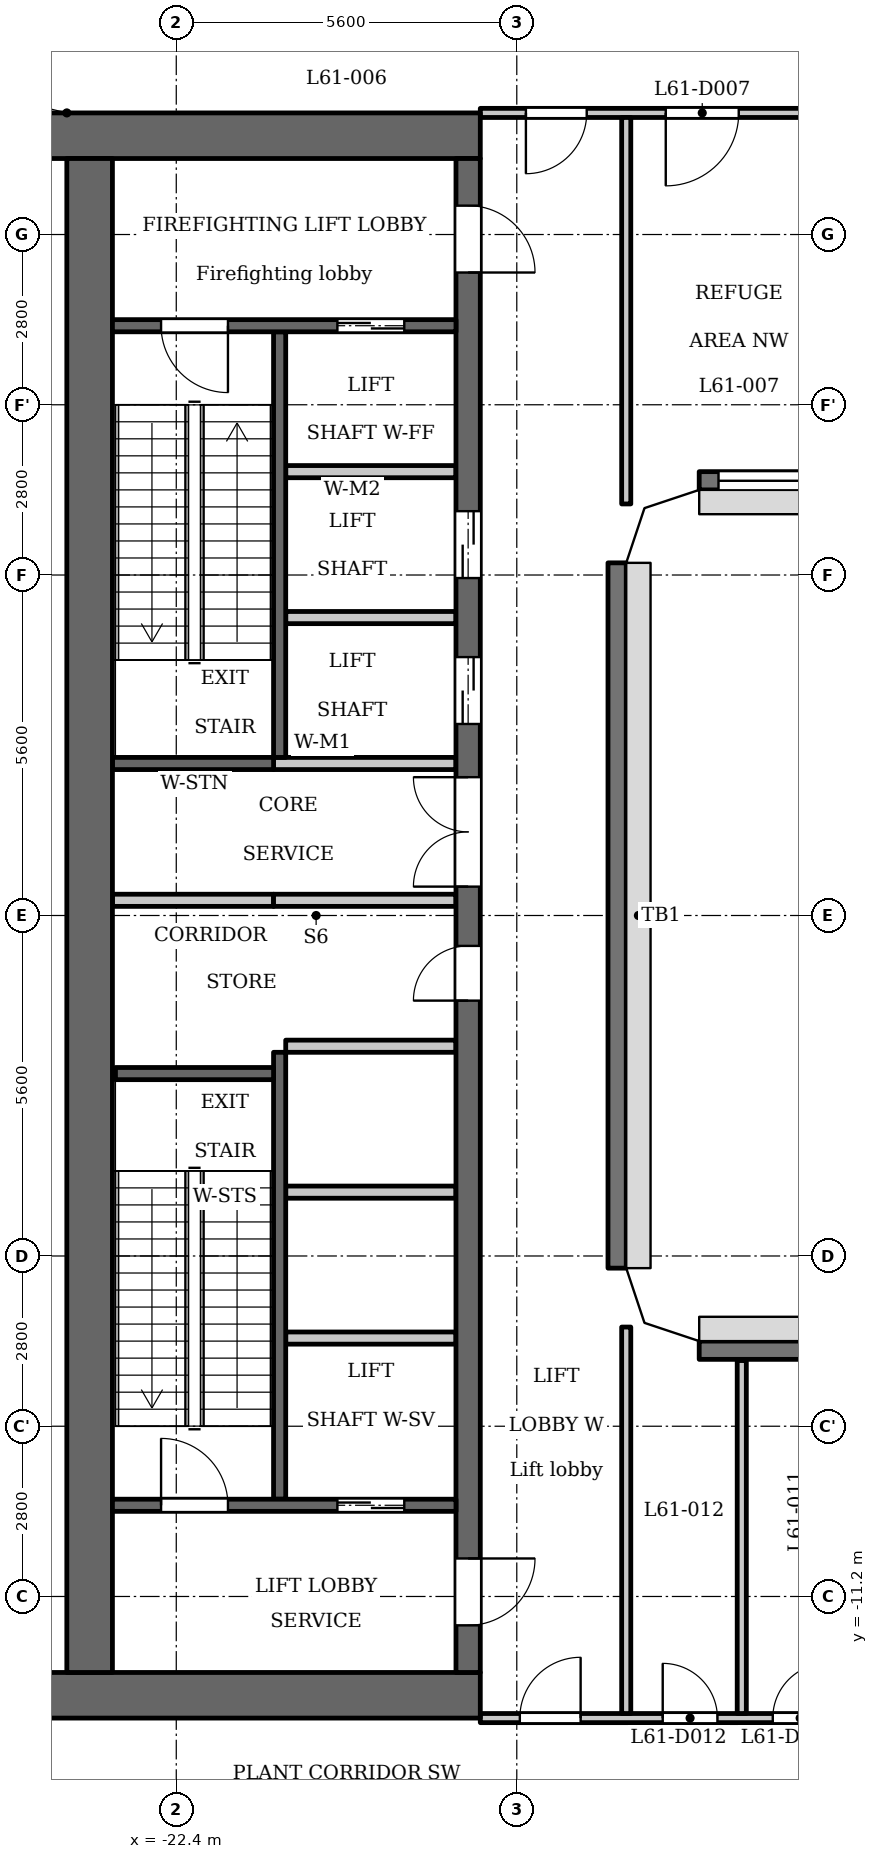
"""IFC4 building model, lengths in metres.
Left out: names, types, materials, properties, quantities, classifications, styles, units other than length and angle.
Written with IfcOpenShell. Run it as: python <this file> out.ifc"""

import sys

from ifc_helpers import new_model, si_unit, direction, frame, frame_2d, origin, place, context, subcontext, project, spatial, polyline, rectangle, outline, extrude, element, fill, save


model = new_model("IFC4")
c1 = context("Model", 3, precision=1e-05, world=origin(), true_north=direction((0.0, 1.0)))
c2 = subcontext(c1, "Body", "Model", "MODEL_VIEW")
j1 = project(units=[si_unit("LENGTHUNIT", "METRE"), si_unit("PLANEANGLEUNIT", "RADIAN")], contexts=[c1])
p1 = place(None, origin())
s1 = spatial("IfcSite", under=j1, at=p1, CompositionType="ELEMENT")
p2 = place(p1, origin())
s2 = spatial("IfcBuilding", under=s1, at=p2, CompositionType="ELEMENT")
p3 = place(p2, frame((0.0, 0.0, 236.3)))
s3 = spatial("IfcBuildingStorey", under=s2, at=p3, CompositionType="ELEMENT", Elevation=236.3)
p4 = place(p3, frame((-11.2, -7.15, 0.0), z_axis=(0.0, 0.0, 1.0), x_axis=(-1.0, 0.0, 0.0)))
e1 = element("IfcWall", 1, at=p4, inside=s3, PredefinedType="SOLIDWALL", context=c2, shape_type="SweptSolid", body=[
    extrude(rectangle(XDim=2.6, YDim=0.3, at=frame_2d((1.3, 0.0))), origin(), (0.0, 0.0, 1.0), 4.6),
])
p5 = place(p3, frame((-15.15, -5.8, 0.0), z_axis=(0.0, 0.0, 1.0), x_axis=(0.0, 1.0, 0.0)))
e2 = element("IfcWall", 2, at=p5, inside=s3, PredefinedType="SOLIDWALL", context=c2, shape_type="SweptSolid", body=[
    extrude(rectangle(XDim=11.6, YDim=0.3, at=frame_2d((5.8, 0.0))), origin(), (0.0, 0.0, 1.0), 4.6),
])
p6 = place(p3, frame((-13.8, 7.15, 0.0), z_axis=(0.0, 0.0, 1.0), x_axis=(1.0, 0.0, 0.0)))
e3 = element("IfcWall", 3, at=p6, inside=s3, PredefinedType="SOLIDWALL", context=c2, shape_type="SweptSolid", body=[
    extrude(rectangle(XDim=2.6, YDim=0.3, at=frame_2d((1.3, 0.0))), origin(), (0.0, 0.0, 1.0), 4.6),
])
p7 = place(p6, frame((0.317, 0.0, 0.9)))
e4 = element("IfcOpeningElement", 4, at=p7, cuts=e3, PredefinedType="OPENING", context=c2, shape_type="SweptSolid", body=[
    extrude(rectangle(XDim=1.8, YDim=1.5, at=frame_2d((0.9, 0.75))), frame((0.0, 0.16, 0.0), z_axis=(0.0, -1.0, 0.0), x_axis=(1.0, 0.0, 0.0)), (0.0, 0.0, 1.0), 0.32),
])
p8 = place(p3, frame((-20.7, 2.6, 0.0), z_axis=(0.0, 0.0, 1.0), x_axis=(0.0, 1.0, 0.0)))
e5 = element("IfcWall", 5, at=p8, inside=s3, PredefinedType="SHEAR", context=c2, shape_type="SweptSolid", body=[
    extrude(rectangle(XDim=7.0, YDim=0.2, at=frame_2d((3.5, 0.0))), origin(), (0.0, 0.0, 1.0), 4.6),
])
p9 = place(p3, frame((-20.7, -9.6, 0.0), z_axis=(0.0, 0.0, 1.0), x_axis=(0.0, 1.0, 0.0)))
e6 = element("IfcWall", 6, at=p9, inside=s3, PredefinedType="SHEAR", context=c2, shape_type="SweptSolid", body=[
    extrude(rectangle(XDim=7.35, YDim=0.2, at=frame_2d((3.675, 0.0))), origin(), (0.0, 0.0, 1.0), 4.6),
])
p10 = place(p3, frame((-20.8, 2.5, 0.0), z_axis=(0.0, 0.0, 1.0), x_axis=(-1.0, 0.0, 0.0)))
e7 = element("IfcWall", 7, at=p10, inside=s3, PredefinedType="SHEAR", context=c2, shape_type="SweptSolid", body=[
    extrude(rectangle(XDim=2.65, YDim=0.2, at=frame_2d((1.325, 0.0))), origin(), (0.0, 0.0, 1.0), 4.6),
])
p11 = place(p3, frame((-20.8, 0.25, 0.0), z_axis=(0.0, 0.0, 1.0), x_axis=(-1.0, 0.0, 0.0)))
e8 = element("IfcWall", 8, at=p11, inside=s3, PredefinedType="PARTITIONING", context=c2, shape_type="SweptSolid", body=[
    extrude(rectangle(XDim=2.65, YDim=0.2, at=frame_2d((1.325, 0.0))), origin(), (0.0, 0.0, 1.0), 4.6),
])
for number, where, z_axis, x_axis in (
    (9, (-17.4, 12.825, 0.0), (0.0, 0.0, 1.0), (-1.0, 0.0, 0.0)),
    (10, (-17.4, -12.825, 0.0), (0.0, 0.0, 1.0), (-1.0, 0.0, 0.0)),
):
    element("IfcWall", number, at=place(p3, frame(where, z_axis=z_axis, x_axis=x_axis)), inside=s3, PredefinedType="SHEAR", context=c2, shape_type="SweptSolid", body=[
        extrude(rectangle(XDim=7.6, YDim=0.75, at=frame_2d((3.8, 0.0))), origin(), (0.0, 0.0, 1.0), 4.6),
    ])
p12 = place(p3, frame((-17.6, -12.45, 0.0), z_axis=(0.0, 0.0, 1.0), x_axis=(0.0, 1.0, 0.0)))
e11 = element("IfcWall", 11, at=p12, inside=s3, PredefinedType="SHEAR", context=c2, shape_type="SweptSolid", body=[
    extrude(rectangle(XDim=24.9, YDim=0.4, at=frame_2d((12.45, 0.0))), origin(), (0.0, 0.0, 1.0), 4.6),
])
p13 = place(p12, frame((11.05, 0.0, 0.0)))
e12 = element("IfcOpeningElement", 12, at=p13, cuts=e11, PredefinedType="OPENING", context=c2, shape_type="SweptSolid", body=[
    extrude(rectangle(XDim=0.9, YDim=2.1, at=frame_2d((0.45, 1.05))), frame((0.0, 0.21, 0.0), z_axis=(0.0, -1.0, 0.0), x_axis=(1.0, 0.0, 0.0)), (0.0, 0.0, 1.0), 0.42),
])
p14 = place(p12, frame((15.6, 0.0, 0.0)))
e13 = element("IfcOpeningElement", 13, at=p14, cuts=e11, PredefinedType="OPENING", context=c2, shape_type="SweptSolid", body=[
    extrude(rectangle(XDim=1.1, YDim=2.1, at=frame_2d((0.55, 1.05))), frame((0.0, 0.21, 0.0), z_axis=(0.0, -1.0, 0.0), x_axis=(1.0, 0.0, 0.0)), (0.0, 0.0, 1.0), 0.42),
])
p15 = place(p12, frame((18.0, 0.0, 0.0)))
e14 = element("IfcOpeningElement", 14, at=p15, cuts=e11, PredefinedType="OPENING", context=c2, shape_type="SweptSolid", body=[
    extrude(rectangle(XDim=1.1, YDim=2.1, at=frame_2d((0.55, 1.05))), frame((0.0, 0.21, 0.0), z_axis=(0.0, -1.0, 0.0), x_axis=(1.0, 0.0, 0.0)), (0.0, 0.0, 1.0), 0.42),
])
p16 = place(p12, frame((23.025, 0.0, 0.0)))
e15 = element("IfcOpeningElement", 15, at=p16, cuts=e11, PredefinedType="OPENING", context=c2, shape_type="SweptSolid", body=[
    extrude(rectangle(XDim=1.1, YDim=2.1, at=frame_2d((0.55, 1.05))), frame((0.0, 0.21, 0.0), z_axis=(0.0, -1.0, 0.0), x_axis=(1.0, 0.0, 0.0)), (0.0, 0.0, 1.0), 0.42),
])
p17 = place(p12, frame((0.775, 0.0, 0.0)))
e16 = element("IfcOpeningElement", 16, at=p17, cuts=e11, PredefinedType="OPENING", context=c2, shape_type="SweptSolid", body=[
    extrude(rectangle(XDim=1.1, YDim=2.1, at=frame_2d((0.55, 1.05))), frame((0.0, 0.21, 0.0), z_axis=(0.0, -1.0, 0.0), x_axis=(1.0, 0.0, 0.0)), (0.0, 0.0, 1.0), 0.42),
])
p18 = place(p12, frame((12.925, 0.0, 0.0)))
e17 = element("IfcOpeningElement", 17, at=p18, cuts=e11, PredefinedType="OPENING", context=c2, shape_type="SweptSolid", body=[
    extrude(rectangle(XDim=1.8, YDim=2.1, at=frame_2d((0.9, 1.05))), frame((0.0, 0.21, 0.0), z_axis=(0.0, -1.0, 0.0), x_axis=(1.0, 0.0, 0.0)), (0.0, 0.0, 1.0), 0.42),
])
p19 = place(p3, frame((-23.825, -12.45, 0.0), z_axis=(0.0, 0.0, 1.0), x_axis=(0.0, 1.0, 0.0)))
e18 = element("IfcWall", 18, at=p19, inside=s3, PredefinedType="SHEAR", context=c2, shape_type="SweptSolid", body=[
    extrude(rectangle(XDim=24.9, YDim=0.75, at=frame_2d((12.45, 0.0))), origin(), (0.0, 0.0, 1.0), 4.6),
])
p20 = place(p3, frame((-17.8, -9.7, 0.0), z_axis=(0.0, 0.0, 1.0), x_axis=(-1.0, 0.0, 0.0)))
e19 = element("IfcWall", 19, at=p20, inside=s3, PredefinedType="SHEAR", context=c2, shape_type="SweptSolid", body=[
    extrude(rectangle(XDim=5.65, YDim=0.2, at=frame_2d((2.825, 0.0))), origin(), (0.0, 0.0, 1.0), 4.6),
])
p21 = place(p20, frame((0.85, 0.0, 0.0)))
e20 = element("IfcOpeningElement", 20, at=p21, cuts=e19, PredefinedType="OPENING", context=c2, shape_type="SweptSolid", body=[
    extrude(rectangle(XDim=1.1, YDim=2.1, at=frame_2d((0.55, 1.05))), frame((0.0, 0.11, 0.0), z_axis=(0.0, -1.0, 0.0), x_axis=(1.0, 0.0, 0.0)), (0.0, 0.0, 1.0), 0.22),
])
p22 = place(p20, frame((3.75, 0.0, 0.0)))
e21 = element("IfcOpeningElement", 21, at=p22, cuts=e19, PredefinedType="OPENING", context=c2, shape_type="SweptSolid", body=[
    extrude(rectangle(XDim=1.1, YDim=2.1, at=frame_2d((0.55, 1.05))), frame((0.0, 0.11, 0.0), z_axis=(0.0, -1.0, 0.0), x_axis=(1.0, 0.0, 0.0)), (0.0, 0.0, 1.0), 0.22),
])
for number, where, z_axis, x_axis in (
    (22, (-17.8, -6.95, 0.0), (0.0, 0.0, 1.0), (-1.0, 0.0, 0.0)),
    (23, (-17.8, -4.55, 0.0), (0.0, 0.0, 1.0), (-1.0, 0.0, 0.0)),
    (24, (-17.8, -2.15, 0.0), (0.0, 0.0, 1.0), (-1.0, 0.0, 0.0)),
):
    element("IfcWall", number, at=place(p3, frame(where, z_axis=z_axis, x_axis=x_axis)), inside=s3, PredefinedType="PARTITIONING", context=c2, shape_type="SweptSolid", body=[
        extrude(rectangle(XDim=2.8, YDim=0.2, at=frame_2d((1.4, 0.0))), origin(), (0.0, 0.0, 1.0), 4.6),
    ])
for number, where, z_axis, x_axis in (
    (25, (-17.8, 0.25, 0.0), (0.0, 0.0, 1.0), (-1.0, 0.0, 0.0)),
    (26, (-17.8, 2.5, 0.0), (0.0, 0.0, 1.0), (-1.0, 0.0, 0.0)),
):
    element("IfcWall", number, at=place(p3, frame(where, z_axis=z_axis, x_axis=x_axis)), inside=s3, PredefinedType="PARTITIONING", context=c2, shape_type="SweptSolid", body=[
        extrude(rectangle(XDim=3.0, YDim=0.2, at=frame_2d((1.5, 0.0))), origin(), (0.0, 0.0, 1.0), 4.6),
    ])
for number, where, z_axis, x_axis in (
    (27, (-17.8, 4.9, 0.0), (0.0, 0.0, 1.0), (-1.0, 0.0, 0.0)),
    (28, (-17.8, 7.3, 0.0), (0.0, 0.0, 1.0), (-1.0, 0.0, 0.0)),
):
    element("IfcWall", number, at=place(p3, frame(where, z_axis=z_axis, x_axis=x_axis)), inside=s3, PredefinedType="PARTITIONING", context=c2, shape_type="SweptSolid", body=[
        extrude(rectangle(XDim=2.8, YDim=0.2, at=frame_2d((1.4, 0.0))), origin(), (0.0, 0.0, 1.0), 4.6),
    ])
p23 = place(p3, frame((-17.8, 9.7, 0.0), z_axis=(0.0, 0.0, 1.0), x_axis=(-1.0, 0.0, 0.0)))
e29 = element("IfcWall", 29, at=p23, inside=s3, PredefinedType="SHEAR", context=c2, shape_type="SweptSolid", body=[
    extrude(rectangle(XDim=5.65, YDim=0.2, at=frame_2d((2.825, 0.0))), origin(), (0.0, 0.0, 1.0), 4.6),
])
p24 = place(p23, frame((0.85, 0.0, 0.0)))
e30 = element("IfcOpeningElement", 30, at=p24, cuts=e29, PredefinedType="OPENING", context=c2, shape_type="SweptSolid", body=[
    extrude(rectangle(XDim=1.1, YDim=2.1, at=frame_2d((0.55, 1.05))), frame((0.0, 0.11, 0.0), z_axis=(0.0, -1.0, 0.0), x_axis=(1.0, 0.0, 0.0)), (0.0, 0.0, 1.0), 0.22),
])
p25 = place(p23, frame((3.75, 0.0, 0.0)))
e31 = element("IfcOpeningElement", 31, at=p25, cuts=e29, PredefinedType="OPENING", context=c2, shape_type="SweptSolid", body=[
    extrude(rectangle(XDim=1.1, YDim=2.1, at=frame_2d((0.55, 1.05))), frame((0.0, 0.11, 0.0), z_axis=(0.0, -1.0, 0.0), x_axis=(1.0, 0.0, 0.0)), (0.0, 0.0, 1.0), 0.22),
])
p26 = place(p3, frame((-20.8, -2.6, 0.0), z_axis=(0.0, 0.0, 1.0), x_axis=(-1.0, 0.0, 0.0)))
e32 = element("IfcWall", 32, at=p26, inside=s3, PredefinedType="SHEAR", context=c2, shape_type="SweptSolid", body=[
    extrude(rectangle(XDim=2.6, YDim=0.2, at=frame_2d((1.3, 0.0))), origin(), (0.0, 0.0, 1.0), 4.6),
])
p27 = place(p3, frame((-17.4, -13.2, 0.0), z_axis=(0.0, 0.0, 1.0), x_axis=(1.0, 0.0, 0.0)))
e33 = element("IfcWall", 33, at=p27, inside=s3, PredefinedType="PARTITIONING", context=c2, shape_type="SweptSolid", body=[
    extrude(rectangle(XDim=5.88, YDim=0.15, at=frame_2d((2.94, 0.0))), origin(), (0.0, 0.0, 1.0), 4.6),
])
p28 = place(p27, frame((0.65, 0.0, 0.0)))
e34 = element("IfcOpeningElement", 34, at=p28, cuts=e33, PredefinedType="OPENING", context=c2, shape_type="SweptSolid", body=[
    extrude(rectangle(XDim=1.0, YDim=2.1, at=frame_2d((0.5, 1.05))), frame((0.0, 0.085, 0.0), z_axis=(0.0, -1.0, 0.0), x_axis=(1.0, 0.0, 0.0)), (0.0, 0.0, 1.0), 0.17),
])
p29 = place(p27, frame((4.81, 0.0, 0.0)))
e35 = element("IfcOpeningElement", 35, at=p29, cuts=e33, PredefinedType="OPENING", context=c2, shape_type="SweptSolid", body=[
    extrude(rectangle(XDim=0.9, YDim=2.1, at=frame_2d((0.45, 1.05))), frame((0.0, 0.085, 0.0), z_axis=(0.0, -1.0, 0.0), x_axis=(1.0, 0.0, 0.0)), (0.0, 0.0, 1.0), 0.17),
])
p30 = place(p27, frame((3.0, 0.0, 0.0)))
e36 = element("IfcOpeningElement", 36, at=p30, cuts=e33, PredefinedType="OPENING", context=c2, shape_type="SweptSolid", body=[
    extrude(rectangle(XDim=0.9, YDim=2.1, at=frame_2d((0.45, 1.05))), frame((0.0, 0.085, 0.0), z_axis=(0.0, -1.0, 0.0), x_axis=(1.0, 0.0, 0.0)), (0.0, 0.0, 1.0), 0.17),
])
p31 = place(p3, frame((-17.4, 13.2, 0.0), z_axis=(0.0, 0.0, 1.0), x_axis=(1.0, 0.0, 0.0)))
e37 = element("IfcWall", 37, at=p31, inside=s3, PredefinedType="PARTITIONING", context=c2, shape_type="SweptSolid", body=[
    extrude(rectangle(XDim=5.88, YDim=0.15, at=frame_2d((2.94, 0.0))), origin(), (0.0, 0.0, 1.0), 4.6),
])
p32 = place(p31, frame((0.75, 0.0, 0.0)))
e38 = element("IfcOpeningElement", 38, at=p32, cuts=e37, PredefinedType="OPENING", context=c2, shape_type="SweptSolid", body=[
    extrude(rectangle(XDim=1.0, YDim=2.1, at=frame_2d((0.5, 1.05))), frame((0.0, 0.085, 0.0), z_axis=(0.0, -1.0, 0.0), x_axis=(1.0, 0.0, 0.0)), (0.0, 0.0, 1.0), 0.17),
])
p33 = place(p31, frame((3.05, 0.0, 0.0)))
e39 = element("IfcOpeningElement", 39, at=p33, cuts=e37, PredefinedType="OPENING", context=c2, shape_type="SweptSolid", body=[
    extrude(rectangle(XDim=1.2, YDim=2.1, at=frame_2d((0.6, 1.05))), frame((0.0, 0.085, 0.0), z_axis=(0.0, -1.0, 0.0), x_axis=(1.0, 0.0, 0.0)), (0.0, 0.0, 1.0), 0.17),
])
for number, where, z_axis, x_axis in (
    (40, (-15.0, -13.125, 0.0), (0.0, 0.0, 1.0), (0.0, 1.0, 0.0)),
    (41, (-15.0, 6.769, 0.0), (0.0, 0.0, 1.0), (0.0, 1.0, 0.0)),
):
    element("IfcWall", number, at=place(p3, frame(where, z_axis=z_axis, x_axis=x_axis)), inside=s3, PredefinedType="PARTITIONING", context=c2, shape_type="SweptSolid", body=[
        extrude(rectangle(XDim=6.356, YDim=0.15, at=frame_2d((3.178, 0.0))), origin(), (0.0, 0.0, 1.0), 4.6),
    ])
p34 = place(p3, frame((-13.1, -13.125, 0.0), z_axis=(0.0, 0.0, 1.0), x_axis=(0.0, 1.0, 0.0)))
e42 = element("IfcWall", 42, at=p34, inside=s3, PredefinedType="PARTITIONING", context=c2, shape_type="SweptSolid", body=[
    extrude(rectangle(XDim=5.805, YDim=0.15, at=frame_2d((2.902, 0.0))), origin(), (0.0, 0.0, 1.0), 4.6),
])
p35 = place(p3, origin())
e43 = element("IfcWall", 43, at=p35, inside=s3, PredefinedType="SOLIDWALL", context=c2, shape_type="SweptSolid", body=[
    extrude(outline(polyline([(-15.0, 5.8), (-14.7, 6.7), (-13.8, 7.0), (-13.8, 7.3), (-13.849, 7.3), (-14.937, 6.937), (-15.3, 5.849), (-15.3, 5.8), (-15.0, 5.8)])), origin(), (0.0, 0.0, 1.0), 4.6),
])
e44 = element("IfcWall", 44, at=p35, inside=s3, PredefinedType="SOLIDWALL", context=c2, shape_type="SweptSolid", body=[
    extrude(outline(polyline([(-13.8, -7.0), (-14.7, -6.7), (-15.0, -5.8), (-15.3, -5.8), (-15.3, -5.849), (-14.937, -6.937), (-13.849, -7.3), (-13.8, -7.3), (-13.8, -7.0)])), origin(), (0.0, 0.0, 1.0), 4.6),
])
p36 = place(p21, origin())
e45 = element("IfcDoor", 45, at=p36, inside=s3, OperationType="DOUBLE_DOOR_SLIDING", PredefinedType="DOOR", context=c2, shape_type="SweptSolid", body=[
    extrude(rectangle(XDim=1.1, YDim=2.1, at=frame_2d((0.55, 1.05))), frame((0.0, 0.025, 0.0), z_axis=(0.0, -1.0, 0.0), x_axis=(1.0, 0.0, 0.0)), (0.0, 0.0, 1.0), 0.05),
])
fill(e20, e45)
p37 = place(p13, origin())
e46 = element("IfcDoor", 46, at=p37, inside=s3, OperationType="SINGLE_SWING_RIGHT", PredefinedType="DOOR", context=c2, shape_type="SweptSolid", body=[
    extrude(rectangle(XDim=0.9, YDim=2.1, at=frame_2d((0.45, 1.05))), frame((0.0, 0.025, 0.0), z_axis=(0.0, -1.0, 0.0), x_axis=(1.0, 0.0, 0.0)), (0.0, 0.0, 1.0), 0.05),
])
fill(e12, e46)
p38 = place(p14, origin())
e47 = element("IfcDoor", 47, at=p38, inside=s3, OperationType="DOUBLE_DOOR_SLIDING", PredefinedType="DOOR", context=c2, shape_type="SweptSolid", body=[
    extrude(rectangle(XDim=1.1, YDim=2.1, at=frame_2d((0.55, 1.05))), frame((0.0, 0.025, 0.0), z_axis=(0.0, -1.0, 0.0), x_axis=(1.0, 0.0, 0.0)), (0.0, 0.0, 1.0), 0.05),
])
fill(e13, e47)
p39 = place(p15, origin())
e48 = element("IfcDoor", 48, at=p39, inside=s3, OperationType="DOUBLE_DOOR_SLIDING", PredefinedType="DOOR", context=c2, shape_type="SweptSolid", body=[
    extrude(rectangle(XDim=1.1, YDim=2.1, at=frame_2d((0.55, 1.05))), frame((0.0, 0.025, 0.0), z_axis=(0.0, -1.0, 0.0), x_axis=(1.0, 0.0, 0.0)), (0.0, 0.0, 1.0), 0.05),
])
fill(e14, e48)
p40 = place(p24, origin())
e49 = element("IfcDoor", 49, at=p40, inside=s3, OperationType="DOUBLE_DOOR_SLIDING", PredefinedType="DOOR", context=c2, shape_type="SweptSolid", body=[
    extrude(rectangle(XDim=1.1, YDim=2.1, at=frame_2d((0.55, 1.05))), frame((0.0, 0.025, 0.0), z_axis=(0.0, -1.0, 0.0), x_axis=(1.0, 0.0, 0.0)), (0.0, 0.0, 1.0), 0.05),
])
fill(e30, e49)
p41 = place(p16, origin())
e50 = element("IfcDoor", 50, at=p41, inside=s3, OperationType="SINGLE_SWING_LEFT", PredefinedType="DOOR", context=c2, shape_type="SweptSolid", body=[
    extrude(rectangle(XDim=1.1, YDim=2.1, at=frame_2d((0.55, 1.05))), frame((0.0, 0.025, 0.0), z_axis=(0.0, -1.0, 0.0), x_axis=(1.0, 0.0, 0.0)), (0.0, 0.0, 1.0), 0.05),
])
fill(e15, e50)
p42 = place(p17, origin())
e51 = element("IfcDoor", 51, at=p42, inside=s3, OperationType="SINGLE_SWING_RIGHT", PredefinedType="DOOR", context=c2, shape_type="SweptSolid", body=[
    extrude(rectangle(XDim=1.1, YDim=2.1, at=frame_2d((0.55, 1.05))), frame((0.0, 0.025, 0.0), z_axis=(0.0, -1.0, 0.0), x_axis=(1.0, 0.0, 0.0)), (0.0, 0.0, 1.0), 0.05),
])
fill(e16, e51)
p43 = place(p25, origin())
e52 = element("IfcDoor", 52, at=p43, inside=s3, OperationType="SINGLE_SWING_RIGHT", PredefinedType="DOOR", context=c2, shape_type="SweptSolid", body=[
    extrude(rectangle(XDim=1.1, YDim=2.1, at=frame_2d((0.55, 1.05))), frame((0.0, 0.025, 0.0), z_axis=(0.0, -1.0, 0.0), x_axis=(1.0, 0.0, 0.0)), (0.0, 0.0, 1.0), 0.05),
])
fill(e31, e52)
p44 = place(p22, origin())
e53 = element("IfcDoor", 53, at=p44, inside=s3, OperationType="SINGLE_SWING_RIGHT", PredefinedType="DOOR", context=c2, shape_type="SweptSolid", body=[
    extrude(rectangle(XDim=1.1, YDim=2.1, at=frame_2d((0.55, 1.05))), frame((0.0, 0.025, 0.0), z_axis=(0.0, -1.0, 0.0), x_axis=(1.0, 0.0, 0.0)), (0.0, 0.0, 1.0), 0.05),
])
fill(e21, e53)
p45 = place(p18, origin())
e54 = element("IfcDoor", 54, at=p45, inside=s3, OperationType="DOUBLE_DOOR_SINGLE_SWING", PredefinedType="DOOR", context=c2, shape_type="SweptSolid", body=[
    extrude(rectangle(XDim=1.8, YDim=2.1, at=frame_2d((0.9, 1.05))), frame((0.0, 0.025, 0.0), z_axis=(0.0, -1.0, 0.0), x_axis=(1.0, 0.0, 0.0)), (0.0, 0.0, 1.0), 0.05),
])
fill(e17, e54)
p46 = place(p32, origin())
e55 = element("IfcDoor", 55, at=p46, inside=s3, OperationType="SINGLE_SWING_LEFT", PredefinedType="DOOR", context=c2, shape_type="SweptSolid", body=[
    extrude(rectangle(XDim=1.0, YDim=2.1, at=frame_2d((0.5, 1.05))), frame((0.0, 0.025, 0.0), z_axis=(0.0, -1.0, 0.0), x_axis=(1.0, 0.0, 0.0)), (0.0, 0.0, 1.0), 0.05),
])
fill(e38, e55)
p47 = place(p33, origin())
e56 = element("IfcDoor", 56, at=p47, inside=s3, OperationType="SINGLE_SWING_LEFT", PredefinedType="DOOR", context=c2, shape_type="SweptSolid", body=[
    extrude(rectangle(XDim=1.2, YDim=2.1, at=frame_2d((0.6, 1.05))), frame((0.0, 0.025, 0.0), z_axis=(0.0, -1.0, 0.0), x_axis=(1.0, 0.0, 0.0)), (0.0, 0.0, 1.0), 0.05),
])
fill(e39, e56)
p48 = place(p28, origin())
e57 = element("IfcDoor", 57, at=p48, inside=s3, OperationType="SINGLE_SWING_LEFT", PredefinedType="DOOR", context=c2, shape_type="SweptSolid", body=[
    extrude(rectangle(XDim=1.0, YDim=2.1, at=frame_2d((0.5, 1.05))), frame((0.0, 0.025, 0.0), z_axis=(0.0, -1.0, 0.0), x_axis=(1.0, 0.0, 0.0)), (0.0, 0.0, 1.0), 0.05),
])
fill(e34, e57)
p49 = place(p29, origin())
e58 = element("IfcDoor", 58, at=p49, inside=s3, OperationType="SINGLE_SWING_LEFT", PredefinedType="DOOR", context=c2, shape_type="SweptSolid", body=[
    extrude(rectangle(XDim=0.9, YDim=2.1, at=frame_2d((0.45, 1.05))), frame((0.0, 0.025, 0.0), z_axis=(0.0, -1.0, 0.0), x_axis=(1.0, 0.0, 0.0)), (0.0, 0.0, 1.0), 0.05),
])
fill(e35, e58)
p50 = place(p30, origin())
e59 = element("IfcDoor", 59, at=p50, inside=s3, OperationType="SINGLE_SWING_RIGHT", PredefinedType="DOOR", context=c2, shape_type="SweptSolid", body=[
    extrude(rectangle(XDim=0.9, YDim=2.1, at=frame_2d((0.45, 1.05))), frame((0.0, 0.025, 0.0), z_axis=(0.0, -1.0, 0.0), x_axis=(1.0, 0.0, 0.0)), (0.0, 0.0, 1.0), 0.05),
])
fill(e36, e59)
p51 = place(p7, origin())
e60 = element("IfcWindow", 60, at=p51, inside=s3, PartitioningType="SINGLE_PANEL", PredefinedType="WINDOW", context=c2, shape_type="SweptSolid", body=[
    extrude(rectangle(XDim=1.8, YDim=1.5, at=frame_2d((0.9, 0.75))), frame((0.0, 0.03, 0.0), z_axis=(0.0, -1.0, 0.0), x_axis=(1.0, 0.0, 0.0)), (0.0, 0.0, 1.0), 0.06),
])
fill(e4, e60)
save(model, sys.argv[1])
